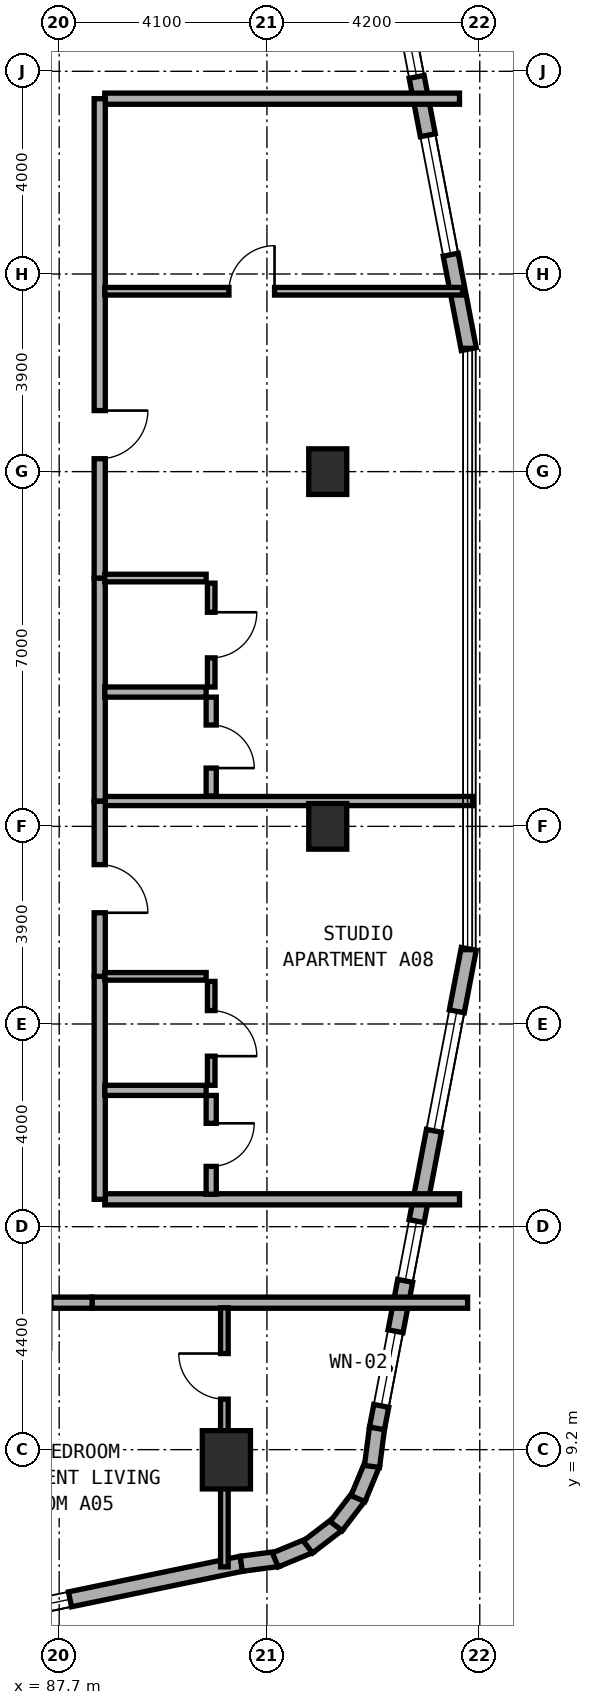
"""IFC4 building model, lengths in metres.
Left out: names, types, materials, properties, quantities, classifications, styles, units other than length and angle.
Written with IfcOpenShell. Run it as: python <this file> out.ifc"""

import sys

from ifc_helpers import new_model, si_unit, direction, frame, frame_2d, origin, origin_2d, place, context, subcontext, project, spatial, rectangle, extrude, element, fill, save


model = new_model("IFC4")
c1 = context("Model", 3, precision=1e-05, world=origin(), true_north=direction((0.0, 1.0)))
c2 = subcontext(c1, "Body", "Model", "MODEL_VIEW")
j1 = project(units=[si_unit("LENGTHUNIT", "METRE"), si_unit("PLANEANGLEUNIT", "RADIAN")], contexts=[c1])
p1 = place(None, origin())
s1 = spatial("IfcSite", under=j1, at=p1, CompositionType="ELEMENT")
p2 = place(p1, origin())
s2 = spatial("IfcBuilding", under=s1, at=p2, CompositionType="ELEMENT")
p3 = place(p2, frame((0.0, 0.0, 59.0)))
s3 = spatial("IfcBuildingStorey", under=s2, at=p3, CompositionType="ELEMENT", Elevation=59.0)
for number, where, z_axis, x_axis in (
    (1, (93.0, 21.5, 0.0), (0.0, 0.0, 1.0), (1.0, 0.0, 0.0)),
    (2, (93.0, 28.5, 0.0), (0.0, 0.0, 1.0), (1.0, 0.0, 0.0)),
):
    element("IfcColumn", number, at=place(p3, frame(where, z_axis=z_axis, x_axis=x_axis)), inside=s3, PredefinedType="COLUMN", context=c2, shape_type="SweptSolid", body=[
        extrude(rectangle(XDim=0.75, YDim=0.9, at=origin_2d()), origin(), (0.0, 0.0, 1.0), 3.5),
    ])
p4 = place(p3, frame((91.0, 9.0, 0.0), z_axis=(0.0, 0.0, 1.0), x_axis=(1.0, 0.0, 0.0)))
e3 = element("IfcColumn", 3, at=p4, inside=s3, PredefinedType="COLUMN", context=c2, shape_type="SweptSolid", body=[
    extrude(rectangle(XDim=0.95, YDim=1.15, at=origin_2d()), origin(), (0.0, 0.0, 1.0), 3.5),
])
p5 = place(p3, frame((82.594, 5.142, 0.0), z_axis=(0.0, 0.0, 1.0), x_axis=(0.979125485139, 0.203256695712, 0.0)))
e4 = element("IfcWall", 4, at=p5, inside=s3, PredefinedType="STANDARD", context=c2, shape_type="SweptSolid", body=[
    extrude(rectangle(XDim=8.89, YDim=0.3, at=frame_2d((4.445, 0.0))), origin(), (0.0, 0.0, 1.0), 3.25),
])
p6 = place(p5, frame((3.033, 0.0, 0.8)))
e5 = element("IfcOpeningElement", 5, at=p6, cuts=e4, PredefinedType="OPENING", context=c2, shape_type="SweptSolid", body=[
    extrude(rectangle(XDim=2.4, YDim=1.6, at=frame_2d((1.2, 0.8))), frame((0.0, 0.16, 0.0), z_axis=(0.0, -1.0, 0.0), x_axis=(1.0, 0.0, 0.0)), (0.0, 0.0, 1.0), 0.32),
])
p7 = place(p3, frame((91.293, 6.948, 0.0), z_axis=(0.0, 0.0, 1.0), x_axis=(0.991486167159, 0.13021205909, 0.0)))
e6 = element("IfcWall", 6, at=p7, inside=s3, PredefinedType="STANDARD", context=c2, shape_type="SweptSolid", body=[
    extrude(rectangle(XDim=0.729, YDim=0.3, at=frame_2d((0.365, 0.0))), origin(), (0.0, 0.0, 1.0), 3.25),
])
for number, where, z_axis, x_axis in (
    (7, (91.965, 7.024, 0.0), (0.0, 0.0, 1.0), (0.924, 0.384, 0.0)),
    (8, (92.609, 7.279, 0.0), (0.0, 0.0, 1.0), (0.794, 0.608, 0.0)),
    (9, (93.166, 7.691, 0.0), (0.0, 0.0, 1.0), (0.609, 0.793, 0.0)),
):
    element("IfcWall", number, at=place(p3, frame(where, z_axis=z_axis, x_axis=x_axis)), inside=s3, PredefinedType="STANDARD", context=c2, shape_type="SweptSolid", body=[
        extrude(rectangle(XDim=0.746, YDim=0.3, at=frame_2d((0.373, 0.0))), origin(), (0.0, 0.0, 1.0), 3.25),
    ])
p8 = place(p3, frame((93.596, 8.234, 0.0), z_axis=(0.0, 0.0, 1.0), x_axis=(0.383430326427, 0.923569805037, 0.0)))
e10 = element("IfcWall", 10, at=p8, inside=s3, PredefinedType="STANDARD", context=c2, shape_type="SweptSolid", body=[
    extrude(rectangle(XDim=0.746, YDim=0.3, at=frame_2d((0.373, 0.0))), origin(), (0.0, 0.0, 1.0), 3.25),
])
p9 = place(p3, frame((93.873, 8.869, 0.0), z_axis=(0.0, 0.0, 1.0), x_axis=(0.129339184068, 0.991600411186, 0.0)))
e11 = element("IfcWall", 11, at=p9, inside=s3, PredefinedType="STANDARD", context=c2, shape_type="SweptSolid", body=[
    extrude(rectangle(XDim=0.764, YDim=0.3, at=frame_2d((0.382, 0.0))), origin(), (0.0, 0.0, 1.0), 3.25),
])
p10 = place(p3, frame((93.971, 9.62, 0.0), z_axis=(0.0, 0.0, 1.0), x_axis=(0.188087874316, 0.982152203854, 0.0)))
e12 = element("IfcWall", 12, at=p10, inside=s3, PredefinedType="STANDARD", context=c2, shape_type="SweptSolid", body=[
    extrude(rectangle(XDim=9.634, YDim=0.3, at=frame_2d((4.817, 0.0))), origin(), (0.0, 0.0, 1.0), 3.25),
])
p11 = place(p10, frame((0.452, 0.0, 0.85)))
e13 = element("IfcOpeningElement", 13, at=p11, cuts=e12, PredefinedType="OPENING", context=c2, shape_type="SweptSolid", body=[
    extrude(rectangle(XDim=1.5, YDim=1.5, at=frame_2d((0.75, 0.75))), frame((0.0, 0.16, 0.0), z_axis=(0.0, -1.0, 0.0), x_axis=(1.0, 0.0, 0.0)), (0.0, 0.0, 1.0), 0.32),
])
p12 = place(p10, frame((2.964, 0.0, 0.85)))
e14 = element("IfcOpeningElement", 14, at=p12, cuts=e12, PredefinedType="OPENING", context=c2, shape_type="SweptSolid", body=[
    extrude(rectangle(XDim=1.2, YDim=1.5, at=frame_2d((0.6, 0.75))), frame((0.0, 0.16, 0.0), z_axis=(0.0, -1.0, 0.0), x_axis=(1.0, 0.0, 0.0)), (0.0, 0.0, 1.0), 0.32),
])
p13 = place(p10, frame((5.979, 0.0, 0.8)))
e15 = element("IfcOpeningElement", 15, at=p13, cuts=e12, PredefinedType="OPENING", context=c2, shape_type="SweptSolid", body=[
    extrude(rectangle(XDim=2.4, YDim=1.6, at=frame_2d((1.2, 0.8))), frame((0.0, 0.16, 0.0), z_axis=(0.0, -1.0, 0.0), x_axis=(1.0, 0.0, 0.0)), (0.0, 0.0, 1.0), 0.32),
])
p14 = place(p3, frame((95.783, 30.918, 0.0), z_axis=(0.0, 0.0, 1.0), x_axis=(-0.188087874316, 0.982152203854, 0.0)))
e16 = element("IfcWall", 16, at=p14, inside=s3, PredefinedType="STANDARD", context=c2, shape_type="SweptSolid", body=[
    extrude(rectangle(XDim=9.634, YDim=0.3, at=frame_2d((4.817, 0.0))), origin(), (0.0, 0.0, 1.0), 3.25),
])
p15 = place(p14, frame((1.897, 0.0, 0.8)))
e17 = element("IfcOpeningElement", 17, at=p15, cuts=e16, PredefinedType="OPENING", context=c2, shape_type="SweptSolid", body=[
    extrude(rectangle(XDim=2.4, YDim=1.6, at=frame_2d((1.2, 0.8))), frame((0.0, 0.16, 0.0), z_axis=(0.0, -1.0, 0.0), x_axis=(1.0, 0.0, 0.0)), (0.0, 0.0, 1.0), 0.32),
])
p16 = place(p14, frame((5.47, 0.0, 0.85)))
e18 = element("IfcOpeningElement", 18, at=p16, cuts=e16, PredefinedType="OPENING", context=c2, shape_type="SweptSolid", body=[
    extrude(rectangle(XDim=1.2, YDim=1.5, at=frame_2d((0.6, 0.75))), frame((0.0, 0.16, 0.0), z_axis=(0.0, -1.0, 0.0), x_axis=(1.0, 0.0, 0.0)), (0.0, 0.0, 1.0), 0.32),
])
p17 = place(p14, frame((7.682, 0.0, 0.85)))
e19 = element("IfcOpeningElement", 19, at=p17, cuts=e16, PredefinedType="OPENING", context=c2, shape_type="SweptSolid", body=[
    extrude(rectangle(XDim=1.5, YDim=1.5, at=frame_2d((0.75, 0.75))), frame((0.0, 0.16, 0.0), z_axis=(0.0, -1.0, 0.0), x_axis=(1.0, 0.0, 0.0)), (0.0, 0.0, 1.0), 0.32),
])
p18 = place(p3, frame((88.35, 12.1, 0.0), z_axis=(0.0, 0.0, 1.0), x_axis=(1.0, 0.0, 0.0)))
e20 = element("IfcWall", 20, at=p18, inside=s3, PredefinedType="SOLIDWALL", context=c2, shape_type="SweptSolid", body=[
    extrude(rectangle(XDim=7.41, YDim=0.22, at=frame_2d((3.705, 0.0))), origin(), (0.0, 0.0, 1.0), 2.865),
])
p19 = place(p3, frame((85.78, 12.1, 0.0), z_axis=(0.0, 0.0, 1.0), x_axis=(1.0, 0.0, 0.0)))
e21 = element("IfcWall", 21, at=p19, inside=s3, PredefinedType="SOLIDWALL", context=c2, shape_type="SweptSolid", body=[
    extrude(rectangle(XDim=2.57, YDim=0.22, at=frame_2d((1.285, 0.0))), origin(), (0.0, 0.0, 1.0), 3.22),
])
p20 = place(p19, frame((0.81, 0.0, 0.0)))
e22 = element("IfcOpeningElement", 22, at=p20, cuts=e21, PredefinedType="OPENING", context=c2, shape_type="SweptSolid", body=[
    extrude(rectangle(XDim=0.95, YDim=2.1, at=frame_2d((0.475, 1.05))), frame((0.0, 0.12, 0.0), z_axis=(0.0, -1.0, 0.0), x_axis=(1.0, 0.0, 0.0)), (0.0, 0.0, 1.0), 0.24),
])
p21 = place(p3, frame((90.96, 6.887, 0.0), z_axis=(0.0, 0.0, 1.0), x_axis=(0.0, 1.0, 0.0)))
e23 = element("IfcWall", 23, at=p21, inside=s3, PredefinedType="PARTITIONING", context=c2, shape_type="SweptSolid", body=[
    extrude(rectangle(XDim=5.113, YDim=0.15, at=frame_2d((2.557, 0.0))), origin(), (0.0, 0.0, 1.0), 2.865),
])
p22 = place(p21, frame((3.31, 0.0, 0.0)))
e24 = element("IfcOpeningElement", 24, at=p22, cuts=e23, PredefinedType="OPENING", context=c2, shape_type="SweptSolid", body=[
    extrude(rectangle(XDim=0.9, YDim=2.1, at=frame_2d((0.45, 1.05))), frame((0.0, 0.085, 0.0), z_axis=(0.0, -1.0, 0.0), x_axis=(1.0, 0.0, 0.0)), (0.0, 0.0, 1.0), 0.17),
])
for number, where, z_axis, x_axis in (
    (25, (88.6, 14.14, 0.0), (0.0, 0.0, 1.0), (1.0, 0.0, 0.0)),
    (26, (88.6, 35.86, 0.0), (0.0, 0.0, 1.0), (1.0, 0.0, 0.0)),
):
    element("IfcWall", number, at=place(p3, frame(where, z_axis=z_axis, x_axis=x_axis)), inside=s3, PredefinedType="SOLIDWALL", context=c2, shape_type="SweptSolid", body=[
        extrude(rectangle(XDim=7.0, YDim=0.22, at=frame_2d((3.5, 0.0))), origin(), (0.0, 0.0, 1.0), 2.865),
    ])
p23 = place(p3, frame((88.5, 22.0, 0.0), z_axis=(0.0, 0.0, 1.0), x_axis=(1.0, 0.0, 0.0)))
e27 = element("IfcWall", 27, at=p23, inside=s3, PredefinedType="SOLIDWALL", context=c2, shape_type="SweptSolid", body=[
    extrude(rectangle(XDim=7.36, YDim=0.18, at=frame_2d((3.68, 0.0))), origin(), (0.0, 0.0, 1.0), 2.865),
])
p24 = place(p3, frame((88.5, 14.14, 0.0), z_axis=(0.0, 0.0, 1.0), x_axis=(0.0, 1.0, 0.0)))
e28 = element("IfcWall", 28, at=p24, inside=s3, PredefinedType="SOLIDWALL", context=c2, shape_type="SweptSolid", body=[
    extrude(rectangle(XDim=4.4, YDim=0.22, at=frame_2d((2.2, 0.0))), origin(), (0.0, 0.0, 1.0), 3.22),
])
p25 = place(p3, frame((88.5, 18.54, 0.0), z_axis=(0.0, 0.0, 1.0), x_axis=(0.0, 1.0, 0.0)))
e29 = element("IfcWall", 29, at=p25, inside=s3, PredefinedType="SOLIDWALL", context=c2, shape_type="SweptSolid", body=[
    extrude(rectangle(XDim=3.46, YDim=0.22, at=frame_2d((1.73, 0.0))), origin(), (0.0, 0.0, 1.0), 2.725),
])
p26 = place(p25, frame((1.255, 0.0, 0.0)))
e30 = element("IfcOpeningElement", 30, at=p26, cuts=e29, PredefinedType="OPENING", context=c2, shape_type="SweptSolid", body=[
    extrude(rectangle(XDim=0.95, YDim=2.1, at=frame_2d((0.475, 1.05))), frame((0.0, 0.12, 0.0), z_axis=(0.0, -1.0, 0.0), x_axis=(1.0, 0.0, 0.0)), (0.0, 0.0, 1.0), 0.24),
])
p27 = place(p3, frame((88.6, 16.29, 0.0), z_axis=(0.0, 0.0, 1.0), x_axis=(1.0, 0.0, 0.0)))
e31 = element("IfcWall", 31, at=p27, inside=s3, PredefinedType="PLUMBINGWALL", context=c2, shape_type="SweptSolid", body=[
    extrude(rectangle(XDim=2.0, YDim=0.2, at=frame_2d((1.0, 0.0))), origin(), (0.0, 0.0, 1.0), 3.22),
])
p28 = place(p3, frame((88.6, 18.54, 0.0), z_axis=(0.0, 0.0, 1.0), x_axis=(1.0, 0.0, 0.0)))
e32 = element("IfcWall", 32, at=p28, inside=s3, PredefinedType="PARTITIONING", context=c2, shape_type="SweptSolid", body=[
    extrude(rectangle(XDim=2.0, YDim=0.15, at=frame_2d((1.0, 0.0))), origin(), (0.0, 0.0, 1.0), 3.22),
])
p29 = place(p3, frame((90.7, 14.24, 0.0), z_axis=(0.0, 0.0, 1.0), x_axis=(0.0, 1.0, 0.0)))
e33 = element("IfcWall", 33, at=p29, inside=s3, PredefinedType="PLUMBINGWALL", context=c2, shape_type="SweptSolid", body=[
    extrude(rectangle(XDim=1.95, YDim=0.2, at=frame_2d((0.975, 0.0))), origin(), (0.0, 0.0, 1.0), 3.22),
])
p30 = place(p29, frame((0.55, 0.0, 0.0)))
e34 = element("IfcOpeningElement", 34, at=p30, cuts=e33, PredefinedType="OPENING", context=c2, shape_type="SweptSolid", body=[
    extrude(rectangle(XDim=0.85, YDim=2.1, at=frame_2d((0.425, 1.05))), frame((0.0, 0.11, 0.0), z_axis=(0.0, -1.0, 0.0), x_axis=(1.0, 0.0, 0.0)), (0.0, 0.0, 1.0), 0.22),
])
p31 = place(p3, frame((90.7, 16.39, 0.0), z_axis=(0.0, 0.0, 1.0), x_axis=(0.0, 1.0, 0.0)))
e35 = element("IfcWall", 35, at=p31, inside=s3, PredefinedType="PARTITIONING", context=c2, shape_type="SweptSolid", body=[
    extrude(rectangle(XDim=2.05, YDim=0.15, at=frame_2d((1.025, 0.0))), origin(), (0.0, 0.0, 1.0), 3.22),
])
p32 = place(p31, frame((0.575, 0.0, 0.0)))
e36 = element("IfcOpeningElement", 36, at=p32, cuts=e35, PredefinedType="OPENING", context=c2, shape_type="SweptSolid", body=[
    extrude(rectangle(XDim=0.9, YDim=2.1, at=frame_2d((0.45, 1.05))), frame((0.0, 0.085, 0.0), z_axis=(0.0, -1.0, 0.0), x_axis=(1.0, 0.0, 0.0)), (0.0, 0.0, 1.0), 0.17),
])
p33 = place(p3, frame((88.5, 22.0, 0.0), z_axis=(0.0, 0.0, 1.0), x_axis=(0.0, 1.0, 0.0)))
e37 = element("IfcWall", 37, at=p33, inside=s3, PredefinedType="SOLIDWALL", context=c2, shape_type="SweptSolid", body=[
    extrude(rectangle(XDim=4.4, YDim=0.22, at=frame_2d((2.2, 0.0))), origin(), (0.0, 0.0, 1.0), 3.22),
])
p34 = place(p3, frame((88.5, 26.4, 0.0), z_axis=(0.0, 0.0, 1.0), x_axis=(0.0, 1.0, 0.0)))
e38 = element("IfcWall", 38, at=p34, inside=s3, PredefinedType="SOLIDWALL", context=c2, shape_type="SweptSolid", body=[
    extrude(rectangle(XDim=9.46, YDim=0.22, at=frame_2d((4.73, 0.0))), origin(), (0.0, 0.0, 1.0), 2.725),
])
p35 = place(p34, frame((2.355, 0.0, 0.0)))
e39 = element("IfcOpeningElement", 39, at=p35, cuts=e38, PredefinedType="OPENING", context=c2, shape_type="SweptSolid", body=[
    extrude(rectangle(XDim=0.95, YDim=2.1, at=frame_2d((0.475, 1.05))), frame((0.0, 0.12, 0.0), z_axis=(0.0, -1.0, 0.0), x_axis=(1.0, 0.0, 0.0)), (0.0, 0.0, 1.0), 0.24),
])
p36 = place(p3, frame((88.6, 32.06, 0.0), z_axis=(0.0, 0.0, 1.0), x_axis=(1.0, 0.0, 0.0)))
e40 = element("IfcWall", 40, at=p36, inside=s3, PredefinedType="PARTITIONING", context=c2, shape_type="SweptSolid", body=[
    extrude(rectangle(XDim=7.06, YDim=0.15, at=frame_2d((3.53, 0.0))), origin(), (0.0, 0.0, 1.0), 2.865),
])
p37 = place(p36, frame((2.45, 0.0, 0.0)))
e41 = element("IfcOpeningElement", 41, at=p37, cuts=e40, PredefinedType="OPENING", context=c2, shape_type="SweptSolid", body=[
    extrude(rectangle(XDim=0.9, YDim=2.1, at=frame_2d((0.45, 1.05))), frame((0.0, 0.085, 0.0), z_axis=(0.0, -1.0, 0.0), x_axis=(1.0, 0.0, 0.0)), (0.0, 0.0, 1.0), 0.17),
])
p38 = place(p3, frame((88.6, 24.15, 0.0), z_axis=(0.0, 0.0, 1.0), x_axis=(1.0, 0.0, 0.0)))
e42 = element("IfcWall", 42, at=p38, inside=s3, PredefinedType="PLUMBINGWALL", context=c2, shape_type="SweptSolid", body=[
    extrude(rectangle(XDim=2.0, YDim=0.2, at=frame_2d((1.0, 0.0))), origin(), (0.0, 0.0, 1.0), 3.22),
])
p39 = place(p3, frame((88.6, 26.4, 0.0), z_axis=(0.0, 0.0, 1.0), x_axis=(1.0, 0.0, 0.0)))
e43 = element("IfcWall", 43, at=p39, inside=s3, PredefinedType="PARTITIONING", context=c2, shape_type="SweptSolid", body=[
    extrude(rectangle(XDim=2.0, YDim=0.15, at=frame_2d((1.0, 0.0))), origin(), (0.0, 0.0, 1.0), 3.22),
])
p40 = place(p3, frame((90.7, 22.1, 0.0), z_axis=(0.0, 0.0, 1.0), x_axis=(0.0, 1.0, 0.0)))
e44 = element("IfcWall", 44, at=p40, inside=s3, PredefinedType="PLUMBINGWALL", context=c2, shape_type="SweptSolid", body=[
    extrude(rectangle(XDim=1.95, YDim=0.2, at=frame_2d((0.975, 0.0))), origin(), (0.0, 0.0, 1.0), 3.22),
])
p41 = place(p40, frame((0.55, 0.0, 0.0)))
e45 = element("IfcOpeningElement", 45, at=p41, cuts=e44, PredefinedType="OPENING", context=c2, shape_type="SweptSolid", body=[
    extrude(rectangle(XDim=0.85, YDim=2.1, at=frame_2d((0.425, 1.05))), frame((0.0, 0.11, 0.0), z_axis=(0.0, -1.0, 0.0), x_axis=(1.0, 0.0, 0.0)), (0.0, 0.0, 1.0), 0.22),
])
p42 = place(p3, frame((90.7, 24.25, 0.0), z_axis=(0.0, 0.0, 1.0), x_axis=(0.0, 1.0, 0.0)))
e46 = element("IfcWall", 46, at=p42, inside=s3, PredefinedType="PARTITIONING", context=c2, shape_type="SweptSolid", body=[
    extrude(rectangle(XDim=2.05, YDim=0.15, at=frame_2d((1.025, 0.0))), origin(), (0.0, 0.0, 1.0), 3.22),
])
p43 = place(p42, frame((0.575, 0.0, 0.0)))
e47 = element("IfcOpeningElement", 47, at=p43, cuts=e46, PredefinedType="OPENING", context=c2, shape_type="SweptSolid", body=[
    extrude(rectangle(XDim=0.9, YDim=2.1, at=frame_2d((0.45, 1.05))), frame((0.0, 0.085, 0.0), z_axis=(0.0, -1.0, 0.0), x_axis=(1.0, 0.0, 0.0)), (0.0, 0.0, 1.0), 0.17),
])
p44 = place(p6, origin())
e48 = element("IfcWindow", 48, at=p44, inside=s3, PartitioningType="SINGLE_PANEL", PredefinedType="WINDOW", context=c2, shape_type="SweptSolid", body=[
    extrude(rectangle(XDim=2.4, YDim=1.6, at=frame_2d((1.2, 0.8))), frame((0.0, 0.03, 0.0), z_axis=(0.0, -1.0, 0.0), x_axis=(1.0, 0.0, 0.0)), (0.0, 0.0, 1.0), 0.06),
])
fill(e5, e48)
p45 = place(p11, origin())
e49 = element("IfcWindow", 49, at=p45, inside=s3, PartitioningType="SINGLE_PANEL", PredefinedType="WINDOW", context=c2, shape_type="SweptSolid", body=[
    extrude(rectangle(XDim=1.5, YDim=1.5, at=frame_2d((0.75, 0.75))), frame((0.0, 0.03, 0.0), z_axis=(0.0, -1.0, 0.0), x_axis=(1.0, 0.0, 0.0)), (0.0, 0.0, 1.0), 0.06),
])
fill(e13, e49)
p46 = place(p12, origin())
e50 = element("IfcWindow", 50, at=p46, inside=s3, PartitioningType="SINGLE_PANEL", PredefinedType="WINDOW", context=c2, shape_type="SweptSolid", body=[
    extrude(rectangle(XDim=1.2, YDim=1.5, at=frame_2d((0.6, 0.75))), frame((0.0, 0.03, 0.0), z_axis=(0.0, -1.0, 0.0), x_axis=(1.0, 0.0, 0.0)), (0.0, 0.0, 1.0), 0.06),
])
fill(e14, e50)
p47 = place(p13, origin())
e51 = element("IfcWindow", 51, at=p47, inside=s3, PartitioningType="SINGLE_PANEL", PredefinedType="WINDOW", context=c2, shape_type="SweptSolid", body=[
    extrude(rectangle(XDim=2.4, YDim=1.6, at=frame_2d((1.2, 0.8))), frame((0.0, 0.03, 0.0), z_axis=(0.0, -1.0, 0.0), x_axis=(1.0, 0.0, 0.0)), (0.0, 0.0, 1.0), 0.06),
])
fill(e15, e51)
p48 = place(p15, origin())
e52 = element("IfcWindow", 52, at=p48, inside=s3, PartitioningType="SINGLE_PANEL", PredefinedType="WINDOW", context=c2, shape_type="SweptSolid", body=[
    extrude(rectangle(XDim=2.4, YDim=1.6, at=frame_2d((1.2, 0.8))), frame((0.0, 0.03, 0.0), z_axis=(0.0, -1.0, 0.0), x_axis=(1.0, 0.0, 0.0)), (0.0, 0.0, 1.0), 0.06),
])
fill(e17, e52)
p49 = place(p16, origin())
e53 = element("IfcWindow", 53, at=p49, inside=s3, PartitioningType="SINGLE_PANEL", PredefinedType="WINDOW", context=c2, shape_type="SweptSolid", body=[
    extrude(rectangle(XDim=1.2, YDim=1.5, at=frame_2d((0.6, 0.75))), frame((0.0, 0.03, 0.0), z_axis=(0.0, -1.0, 0.0), x_axis=(1.0, 0.0, 0.0)), (0.0, 0.0, 1.0), 0.06),
])
fill(e18, e53)
p50 = place(p22, origin())
e54 = element("IfcDoor", 54, at=p50, inside=s3, OperationType="SINGLE_SWING_RIGHT", PredefinedType="DOOR", context=c2, shape_type="SweptSolid", body=[
    extrude(rectangle(XDim=0.9, YDim=2.1, at=frame_2d((0.45, 1.05))), frame((0.0, 0.025, 0.0), z_axis=(0.0, -1.0, 0.0), x_axis=(1.0, 0.0, 0.0)), (0.0, 0.0, 1.0), 0.05),
])
fill(e24, e54)
p51 = place(p26, frame((0.95, 0.0, 0.0), z_axis=(0.0, 0.0, 1.0), x_axis=(-1.0, 0.0, 0.0)))
e55 = element("IfcDoor", 55, at=p51, inside=s3, OperationType="SINGLE_SWING_RIGHT", PredefinedType="DOOR", context=c2, shape_type="SweptSolid", body=[
    extrude(rectangle(XDim=0.95, YDim=2.1, at=frame_2d((0.475, 1.05))), frame((0.0, 0.025, 0.0), z_axis=(0.0, -1.0, 0.0), x_axis=(1.0, 0.0, 0.0)), (0.0, 0.0, 1.0), 0.05),
])
fill(e30, e55)
p52 = place(p30, frame((0.85, 0.0, 0.0), z_axis=(0.0, 0.0, 1.0), x_axis=(-1.0, 0.0, 0.0)))
e56 = element("IfcDoor", 56, at=p52, inside=s3, OperationType="SINGLE_SWING_LEFT", PredefinedType="DOOR", context=c2, shape_type="SweptSolid", body=[
    extrude(rectangle(XDim=0.85, YDim=2.1, at=frame_2d((0.425, 1.05))), frame((0.0, 0.025, 0.0), z_axis=(0.0, -1.0, 0.0), x_axis=(1.0, 0.0, 0.0)), (0.0, 0.0, 1.0), 0.05),
])
fill(e34, e56)
p53 = place(p32, frame((0.9, 0.0, 0.0), z_axis=(0.0, 0.0, 1.0), x_axis=(-1.0, 0.0, 0.0)))
e57 = element("IfcDoor", 57, at=p53, inside=s3, OperationType="SINGLE_SWING_RIGHT", PredefinedType="DOOR", context=c2, shape_type="SweptSolid", body=[
    extrude(rectangle(XDim=0.9, YDim=2.1, at=frame_2d((0.45, 1.05))), frame((0.0, 0.025, 0.0), z_axis=(0.0, -1.0, 0.0), x_axis=(1.0, 0.0, 0.0)), (0.0, 0.0, 1.0), 0.05),
])
fill(e36, e57)
p54 = place(p35, frame((0.95, 0.0, 0.0), z_axis=(0.0, 0.0, 1.0), x_axis=(-1.0, 0.0, 0.0)))
e58 = element("IfcDoor", 58, at=p54, inside=s3, OperationType="SINGLE_SWING_LEFT", PredefinedType="DOOR", context=c2, shape_type="SweptSolid", body=[
    extrude(rectangle(XDim=0.95, YDim=2.1, at=frame_2d((0.475, 1.05))), frame((0.0, 0.025, 0.0), z_axis=(0.0, -1.0, 0.0), x_axis=(1.0, 0.0, 0.0)), (0.0, 0.0, 1.0), 0.05),
])
fill(e39, e58)
p55 = place(p37, origin())
e59 = element("IfcDoor", 59, at=p55, inside=s3, OperationType="SINGLE_SWING_RIGHT", PredefinedType="DOOR", context=c2, shape_type="SweptSolid", body=[
    extrude(rectangle(XDim=0.9, YDim=2.1, at=frame_2d((0.45, 1.05))), frame((0.0, 0.025, 0.0), z_axis=(0.0, -1.0, 0.0), x_axis=(1.0, 0.0, 0.0)), (0.0, 0.0, 1.0), 0.05),
])
fill(e41, e59)
p56 = place(p41, frame((0.85, 0.0, 0.0), z_axis=(0.0, 0.0, 1.0), x_axis=(-1.0, 0.0, 0.0)))
e60 = element("IfcDoor", 60, at=p56, inside=s3, OperationType="SINGLE_SWING_RIGHT", PredefinedType="DOOR", context=c2, shape_type="SweptSolid", body=[
    extrude(rectangle(XDim=0.85, YDim=2.1, at=frame_2d((0.425, 1.05))), frame((0.0, 0.025, 0.0), z_axis=(0.0, -1.0, 0.0), x_axis=(1.0, 0.0, 0.0)), (0.0, 0.0, 1.0), 0.05),
])
fill(e45, e60)
p57 = place(p43, frame((0.9, 0.0, 0.0), z_axis=(0.0, 0.0, 1.0), x_axis=(-1.0, 0.0, 0.0)))
e61 = element("IfcDoor", 61, at=p57, inside=s3, OperationType="SINGLE_SWING_LEFT", PredefinedType="DOOR", context=c2, shape_type="SweptSolid", body=[
    extrude(rectangle(XDim=0.9, YDim=2.1, at=frame_2d((0.45, 1.05))), frame((0.0, 0.025, 0.0), z_axis=(0.0, -1.0, 0.0), x_axis=(1.0, 0.0, 0.0)), (0.0, 0.0, 1.0), 0.05),
])
fill(e47, e61)
save(model, sys.argv[1])
